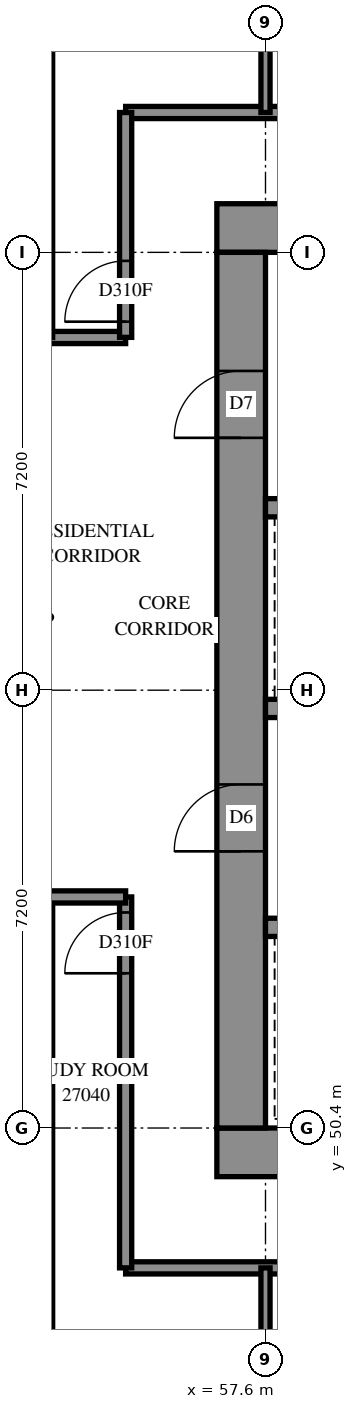
"""IFC4 building model, lengths in metres.
Left out: names, types, materials, properties, quantities, classifications, styles, units other than length and angle.
Written with IfcOpenShell. Run it as: python <this file> out.ifc"""

import sys

from ifc_helpers import new_model, si_unit, direction, frame, frame_2d, origin, place, context, subcontext, project, spatial, rectangle, extrude, element, fill, save


model = new_model("IFC4")
c1 = context("Model", 3, precision=1e-05, world=origin(), true_north=direction((0.0, 1.0)))
c2 = subcontext(c1, "Body", "Model", "MODEL_VIEW")
j1 = project(units=[si_unit("LENGTHUNIT", "METRE"), si_unit("PLANEANGLEUNIT", "RADIAN")], contexts=[c1])
p1 = place(None, origin())
s1 = spatial("IfcSite", under=j1, at=p1, CompositionType="ELEMENT")
p2 = place(p1, origin())
s2 = spatial("IfcBuilding", under=s1, at=p2, CompositionType="ELEMENT")
p3 = place(p2, frame((0.0, 0.0, 101.6)))
s3 = spatial("IfcBuildingStorey", under=s2, at=p3, CompositionType="ELEMENT", Elevation=101.6)
p4 = place(p3, frame((56.8, 50.0, -0.3), z_axis=(0.0, 0.0, 1.0), x_axis=(1.0, 0.0, 0.0)))
e1 = element("IfcWall", 1, at=p4, inside=s3, PredefinedType="SHEAR", context=c2, shape_type="SweptSolid", body=[
    extrude(rectangle(XDim=16.0, YDim=0.8, at=frame_2d((8.0, 0.0))), origin(), (0.0, 0.0, 1.0), 2.7),
])
p5 = place(p3, frame((56.8, 65.2, -0.3), z_axis=(0.0, 0.0, 1.0), x_axis=(1.0, 0.0, 0.0)))
e2 = element("IfcWall", 2, at=p5, inside=s3, PredefinedType="SHEAR", context=c2, shape_type="SweptSolid", body=[
    extrude(rectangle(XDim=16.0, YDim=0.8, at=frame_2d((8.0, 0.0))), origin(), (0.0, 0.0, 1.0), 2.7),
])
p6 = place(p5, frame((10.8, 0.0, 0.3)))
e3 = element("IfcOpeningElement", 3, at=p6, cuts=e2, PredefinedType="OPENING", context=c2, shape_type="SweptSolid", body=[
    extrude(rectangle(XDim=0.8, YDim=2.1, at=frame_2d((0.4, 1.05))), frame((0.0, 0.41, 0.0), z_axis=(0.0, -1.0, 0.0), x_axis=(1.0, 0.0, 0.0)), (0.0, 0.0, 1.0), 0.82),
])
p7 = place(p3, frame((57.2, 50.4, -0.3), z_axis=(0.0, 0.0, 1.0), x_axis=(0.0, 1.0, 0.0)))
e4 = element("IfcWall", 4, at=p7, inside=s3, PredefinedType="SHEAR", context=c2, shape_type="SweptSolid", body=[
    extrude(rectangle(XDim=14.4, YDim=0.8, at=frame_2d((7.2, 0.0))), origin(), (0.0, 0.0, 1.0), 2.7),
])
p8 = place(p7, frame((4.55, 0.0, 0.3)))
e5 = element("IfcOpeningElement", 5, at=p8, cuts=e4, PredefinedType="OPENING", context=c2, shape_type="SweptSolid", body=[
    extrude(rectangle(XDim=1.1, YDim=2.1, at=frame_2d((0.55, 1.05))), frame((0.0, 0.41, 0.0), z_axis=(0.0, -1.0, 0.0), x_axis=(1.0, 0.0, 0.0)), (0.0, 0.0, 1.0), 0.82),
])
p9 = place(p7, frame((11.35, 0.0, 0.3)))
e6 = element("IfcOpeningElement", 6, at=p9, cuts=e4, PredefinedType="OPENING", context=c2, shape_type="SweptSolid", body=[
    extrude(rectangle(XDim=1.1, YDim=2.1, at=frame_2d((0.55, 1.05))), frame((0.0, 0.41, 0.0), z_axis=(0.0, -1.0, 0.0), x_axis=(1.0, 0.0, 0.0)), (0.0, 0.0, 1.0), 0.82),
])
p10 = place(p3, frame((57.6, 53.7, 0.0), z_axis=(0.0, 0.0, 1.0), x_axis=(1.0, 0.0, 0.0)))
e7 = element("IfcWall", 7, at=p10, inside=s3, PredefinedType="SOLIDWALL", context=c2, shape_type="SweptSolid", body=[
    extrude(rectangle(XDim=14.4, YDim=0.3, at=frame_2d((7.2, 0.0))), origin(), (0.0, 0.0, 1.0), 3.1),
])
p11 = place(p10, frame((1.25, 0.0, 0.0)))
e8 = element("IfcOpeningElement", 8, at=p11, cuts=e7, PredefinedType="OPENING", context=c2, shape_type="SweptSolid", body=[
    extrude(rectangle(XDim=1.1, YDim=2.1, at=frame_2d((0.55, 1.05))), frame((0.0, 0.16, 0.0), z_axis=(0.0, -1.0, 0.0), x_axis=(1.0, 0.0, 0.0)), (0.0, 0.0, 1.0), 0.32),
])
p12 = place(p10, frame((4.85, 0.0, 0.0)))
e9 = element("IfcOpeningElement", 9, at=p12, cuts=e7, PredefinedType="OPENING", context=c2, shape_type="SweptSolid", body=[
    extrude(rectangle(XDim=1.1, YDim=2.1, at=frame_2d((0.55, 1.05))), frame((0.0, 0.16, 0.0), z_axis=(0.0, -1.0, 0.0), x_axis=(1.0, 0.0, 0.0)), (0.0, 0.0, 1.0), 0.32),
])
p13 = place(p10, frame((8.45, 0.0, 0.0)))
e10 = element("IfcOpeningElement", 10, at=p13, cuts=e7, PredefinedType="OPENING", context=c2, shape_type="SweptSolid", body=[
    extrude(rectangle(XDim=1.1, YDim=2.1, at=frame_2d((0.55, 1.05))), frame((0.0, 0.16, 0.0), z_axis=(0.0, -1.0, 0.0), x_axis=(1.0, 0.0, 0.0)), (0.0, 0.0, 1.0), 0.32),
])
p14 = place(p10, frame((12.05, 0.0, 0.0)))
e11 = element("IfcOpeningElement", 11, at=p14, cuts=e7, PredefinedType="OPENING", context=c2, shape_type="SweptSolid", body=[
    extrude(rectangle(XDim=1.1, YDim=2.1, at=frame_2d((0.55, 1.05))), frame((0.0, 0.16, 0.0), z_axis=(0.0, -1.0, 0.0), x_axis=(1.0, 0.0, 0.0)), (0.0, 0.0, 1.0), 0.32),
])
p15 = place(p3, frame((57.6, 57.3, 0.0), z_axis=(0.0, 0.0, 1.0), x_axis=(1.0, 0.0, 0.0)))
e12 = element("IfcWall", 12, at=p15, inside=s3, PredefinedType="SOLIDWALL", context=c2, shape_type="SweptSolid", body=[
    extrude(rectangle(XDim=14.4, YDim=0.3, at=frame_2d((7.2, 0.0))), origin(), (0.0, 0.0, 1.0), 3.1),
])
p16 = place(p15, frame((12.05, 0.0, 0.0)))
e13 = element("IfcOpeningElement", 13, at=p16, cuts=e12, PredefinedType="OPENING", context=c2, shape_type="SweptSolid", body=[
    extrude(rectangle(XDim=1.1, YDim=2.1, at=frame_2d((0.55, 1.05))), frame((0.0, 0.16, 0.0), z_axis=(0.0, -1.0, 0.0), x_axis=(1.0, 0.0, 0.0)), (0.0, 0.0, 1.0), 0.32),
])
p17 = place(p3, frame((57.6, 60.6, 0.0), z_axis=(0.0, 0.0, 1.0), x_axis=(1.0, 0.0, 0.0)))
e14 = element("IfcWall", 14, at=p17, inside=s3, PredefinedType="SOLIDWALL", context=c2, shape_type="SweptSolid", body=[
    extrude(rectangle(XDim=7.2, YDim=0.3, at=frame_2d((3.6, 0.0))), origin(), (0.0, 0.0, 1.0), 3.1),
])
p18 = place(p3, frame((33.4, 63.4, 0.0), z_axis=(0.0, 0.0, 1.0), x_axis=(1.0, 0.0, 0.0)))
e15 = element("IfcWall", 15, at=p18, inside=s3, PredefinedType="PARTITIONING", context=c2, shape_type="SweptSolid", body=[
    extrude(rectangle(XDim=21.9, YDim=0.2, at=frame_2d((10.95, 0.0))), origin(), (0.0, 0.0, 1.0), 3.1),
])
p19 = place(p18, frame((3.152, 0.0, 0.0)))
e16 = element("IfcOpeningElement", 16, at=p19, cuts=e15, PredefinedType="OPENING", context=c2, shape_type="SweptSolid", body=[
    extrude(rectangle(XDim=0.9, YDim=2.1, at=frame_2d((0.45, 1.05))), frame((0.0, 0.11, 0.0), z_axis=(0.0, -1.0, 0.0), x_axis=(1.0, 0.0, 0.0)), (0.0, 0.0, 1.0), 0.22),
])
p20 = place(p18, frame((8.161, 0.0, 0.0)))
e17 = element("IfcOpeningElement", 17, at=p20, cuts=e15, PredefinedType="OPENING", context=c2, shape_type="SweptSolid", body=[
    extrude(rectangle(XDim=0.9, YDim=2.1, at=frame_2d((0.45, 1.05))), frame((0.0, 0.11, 0.0), z_axis=(0.0, -1.0, 0.0), x_axis=(1.0, 0.0, 0.0)), (0.0, 0.0, 1.0), 0.22),
])
p21 = place(p18, frame((15.471, 0.0, 0.0)))
e18 = element("IfcOpeningElement", 18, at=p21, cuts=e15, PredefinedType="OPENING", context=c2, shape_type="SweptSolid", body=[
    extrude(rectangle(XDim=1.0, YDim=2.1, at=frame_2d((0.5, 1.05))), frame((0.0, 0.11, 0.0), z_axis=(0.0, -1.0, 0.0), x_axis=(1.0, 0.0, 0.0)), (0.0, 0.0, 1.0), 0.22),
])
p22 = place(p3, frame((55.3, 48.1, 0.0), z_axis=(0.0, 0.0, 1.0), x_axis=(1.0, 0.0, 0.0)))
e19 = element("IfcWall", 19, at=p22, inside=s3, PredefinedType="PARTITIONING", context=c2, shape_type="SweptSolid", body=[
    extrude(rectangle(XDim=19.092, YDim=0.2, at=frame_2d((9.546, 0.0))), origin(), (0.0, 0.0, 1.0), 3.1),
])
p23 = place(p22, frame((4.6, 0.0, 0.0)))
e20 = element("IfcOpeningElement", 20, at=p23, cuts=e19, PredefinedType="OPENING", context=c2, shape_type="SweptSolid", body=[
    extrude(rectangle(XDim=0.9, YDim=2.1, at=frame_2d((0.45, 1.05))), frame((0.0, 0.11, 0.0), z_axis=(0.0, -1.0, 0.0), x_axis=(1.0, 0.0, 0.0)), (0.0, 0.0, 1.0), 0.22),
])
p24 = place(p22, frame((8.239, 0.0, 0.0)))
e21 = element("IfcOpeningElement", 21, at=p24, cuts=e19, PredefinedType="OPENING", context=c2, shape_type="SweptSolid", body=[
    extrude(rectangle(XDim=0.9, YDim=2.1, at=frame_2d((0.45, 1.05))), frame((0.0, 0.11, 0.0), z_axis=(0.0, -1.0, 0.0), x_axis=(1.0, 0.0, 0.0)), (0.0, 0.0, 1.0), 0.22),
])
p25 = place(p22, frame((13.5, 0.0, 0.0)))
e22 = element("IfcOpeningElement", 22, at=p25, cuts=e19, PredefinedType="OPENING", context=c2, shape_type="SweptSolid", body=[
    extrude(rectangle(XDim=0.9, YDim=2.1, at=frame_2d((0.45, 1.05))), frame((0.0, 0.11, 0.0), z_axis=(0.0, -1.0, 0.0), x_axis=(1.0, 0.0, 0.0)), (0.0, 0.0, 1.0), 0.22),
])
p26 = place(p3, frame((55.3, 67.1, 0.0), z_axis=(0.0, 0.0, 1.0), x_axis=(1.0, 0.0, 0.0)))
e23 = element("IfcWall", 23, at=p26, inside=s3, PredefinedType="PARTITIONING", context=c2, shape_type="SweptSolid", body=[
    extrude(rectangle(XDim=19.0, YDim=0.2, at=frame_2d((9.5, 0.0))), origin(), (0.0, 0.0, 1.0), 3.1),
])
p27 = place(p26, frame((6.199, 0.0, 0.0)))
e24 = element("IfcOpeningElement", 24, at=p27, cuts=e23, PredefinedType="OPENING", context=c2, shape_type="SweptSolid", body=[
    extrude(rectangle(XDim=0.9, YDim=2.1, at=frame_2d((0.45, 1.05))), frame((0.0, 0.11, 0.0), z_axis=(0.0, -1.0, 0.0), x_axis=(1.0, 0.0, 0.0)), (0.0, 0.0, 1.0), 0.22),
])
p28 = place(p26, frame((13.399, 0.0, 0.0)))
e25 = element("IfcOpeningElement", 25, at=p28, cuts=e23, PredefinedType="OPENING", context=c2, shape_type="SweptSolid", body=[
    extrude(rectangle(XDim=0.9, YDim=2.1, at=frame_2d((0.45, 1.05))), frame((0.0, 0.11, 0.0), z_axis=(0.0, -1.0, 0.0), x_axis=(1.0, 0.0, 0.0)), (0.0, 0.0, 1.0), 0.22),
])
p29 = place(p3, frame((55.3, 48.1, 0.0), z_axis=(0.0, 0.0, 1.0), x_axis=(0.0, 1.0, 0.0)))
e26 = element("IfcWall", 26, at=p29, inside=s3, PredefinedType="PARTITIONING", context=c2, shape_type="SweptSolid", body=[
    extrude(rectangle(XDim=6.1, YDim=0.2, at=frame_2d((3.05, 0.0))), origin(), (0.0, 0.0, 1.0), 3.1),
])
p30 = place(p29, frame((4.845, 0.0, 0.0)))
e27 = element("IfcOpeningElement", 27, at=p30, cuts=e26, PredefinedType="OPENING", context=c2, shape_type="SweptSolid", body=[
    extrude(rectangle(XDim=1.0, YDim=2.1, at=frame_2d((0.5, 1.05))), frame((0.0, 0.11, 0.0), z_axis=(0.0, -1.0, 0.0), x_axis=(1.0, 0.0, 0.0)), (0.0, 0.0, 1.0), 0.22),
])
p31 = place(p3, frame((50.4, 54.2, 0.0), z_axis=(0.0, 0.0, 1.0), x_axis=(1.0, 0.0, 0.0)))
e28 = element("IfcWall", 28, at=p31, inside=s3, PredefinedType="PARTITIONING", context=c2, shape_type="SweptSolid", body=[
    extrude(rectangle(XDim=4.9, YDim=0.2, at=frame_2d((2.45, 0.0))), origin(), (0.0, 0.0, 1.0), 3.1),
])
p32 = place(p31, frame((2.3, 0.0, 0.0)))
e29 = element("IfcOpeningElement", 29, at=p32, cuts=e28, PredefinedType="OPENING", context=c2, shape_type="SweptSolid", body=[
    extrude(rectangle(XDim=0.9, YDim=2.1, at=frame_2d((0.45, 1.05))), frame((0.0, 0.11, 0.0), z_axis=(0.0, -1.0, 0.0), x_axis=(1.0, 0.0, 0.0)), (0.0, 0.0, 1.0), 0.22),
])
p33 = place(p3, frame((55.3, 63.402, 0.0), z_axis=(0.0, 0.0, 1.0), x_axis=(0.0, 1.0, 0.0)))
e30 = element("IfcWall", 30, at=p33, inside=s3, PredefinedType="PARTITIONING", context=c2, shape_type="SweptSolid", body=[
    extrude(rectangle(XDim=3.698, YDim=0.2, at=frame_2d((1.849, 0.0))), origin(), (0.0, 0.0, 1.0), 3.1),
])
p34 = place(p33, frame((0.258, 0.0, 0.0)))
e31 = element("IfcOpeningElement", 31, at=p34, cuts=e30, PredefinedType="OPENING", context=c2, shape_type="SweptSolid", body=[
    extrude(rectangle(XDim=1.0, YDim=2.1, at=frame_2d((0.5, 1.05))), frame((0.0, 0.11, 0.0), z_axis=(0.0, -1.0, 0.0), x_axis=(1.0, 0.0, 0.0)), (0.0, 0.0, 1.0), 0.22),
])
for number, where, z_axis, x_axis in (
    (32, (57.6, 67.1, 0.0), (0.0, 0.0, 1.0), (0.0, 1.0, 0.0)),
    (33, (57.6, 45.7, 0.0), (0.0, 0.0, 1.0), (0.0, 1.0, 0.0)),
):
    element("IfcWall", number, at=place(p3, frame(where, z_axis=z_axis, x_axis=x_axis)), inside=s3, PredefinedType="PARTITIONING", context=c2, shape_type="SweptSolid", body=[
        extrude(rectangle(XDim=2.4, YDim=0.15, at=frame_2d((1.2, 0.0))), origin(), (0.0, 0.0, 1.0), 3.1),
    ])
p35 = place(p8, origin())
e34 = element("IfcDoor", 34, at=p35, inside=s3, OperationType="DOUBLE_DOOR_SINGLE_SWING", PredefinedType="DOOR", context=c2, shape_type="SweptSolid", body=[
    extrude(rectangle(XDim=1.1, YDim=2.1, at=frame_2d((0.55, 1.05))), frame((0.0, 0.025, 0.0), z_axis=(0.0, -1.0, 0.0), x_axis=(1.0, 0.0, 0.0)), (0.0, 0.0, 1.0), 0.05),
])
fill(e5, e34)
p36 = place(p9, origin())
e35 = element("IfcDoor", 35, at=p36, inside=s3, OperationType="SINGLE_SWING_LEFT", PredefinedType="DOOR", context=c2, shape_type="SweptSolid", body=[
    extrude(rectangle(XDim=1.1, YDim=2.1, at=frame_2d((0.55, 1.05))), frame((0.0, 0.025, 0.0), z_axis=(0.0, -1.0, 0.0), x_axis=(1.0, 0.0, 0.0)), (0.0, 0.0, 1.0), 0.05),
])
fill(e6, e35)
p37 = place(p34, origin())
e36 = element("IfcDoor", 36, at=p37, inside=s3, OperationType="SINGLE_SWING_LEFT", PredefinedType="DOOR", context=c2, shape_type="SweptSolid", body=[
    extrude(rectangle(XDim=1.0, YDim=2.1, at=frame_2d((0.5, 1.05))), frame((0.0, 0.025, 0.0), z_axis=(0.0, -1.0, 0.0), x_axis=(1.0, 0.0, 0.0)), (0.0, 0.0, 1.0), 0.05),
])
fill(e31, e36)
p38 = place(p30, origin())
e37 = element("IfcDoor", 37, at=p38, inside=s3, OperationType="SINGLE_SWING_RIGHT", PredefinedType="DOOR", context=c2, shape_type="SweptSolid", body=[
    extrude(rectangle(XDim=1.0, YDim=2.1, at=frame_2d((0.5, 1.05))), frame((0.0, 0.025, 0.0), z_axis=(0.0, -1.0, 0.0), x_axis=(1.0, 0.0, 0.0)), (0.0, 0.0, 1.0), 0.05),
])
fill(e27, e37)
save(model, sys.argv[1])
